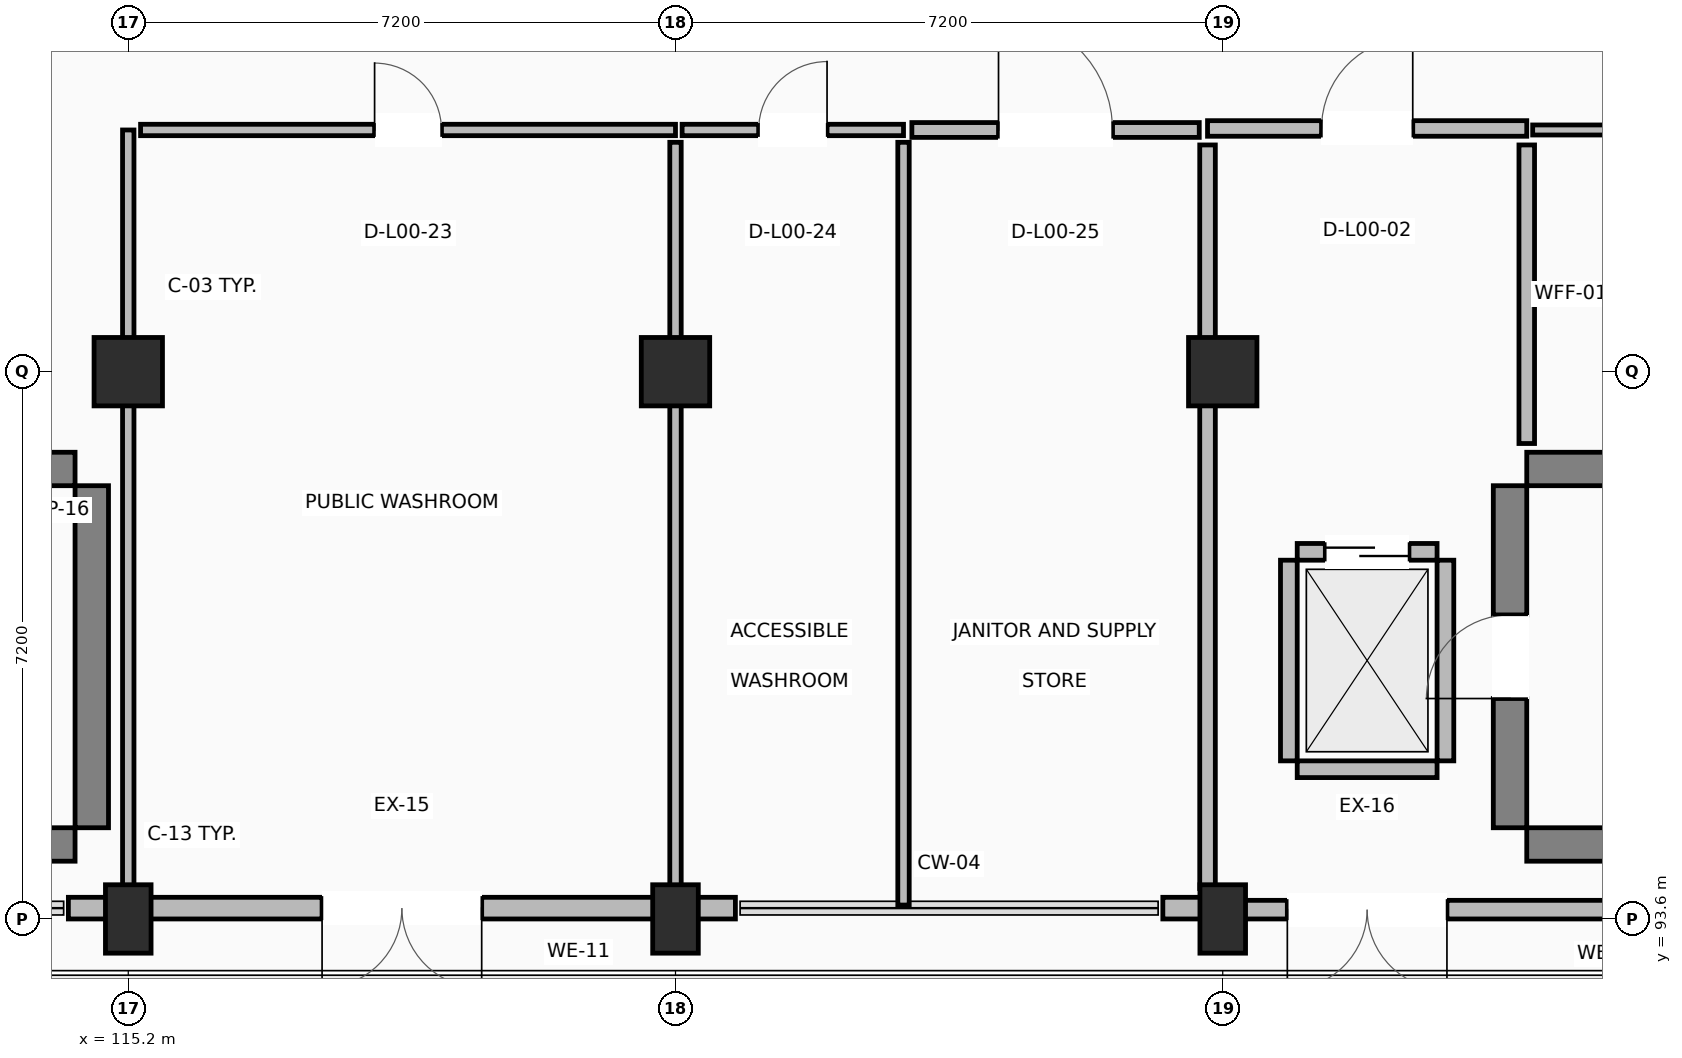
"""IFC4 building model, lengths in metres.
Left out: names, types, materials, properties, quantities, classifications, styles, units other than length and angle.
Written with IfcOpenShell. Run it as: python <this file> out.ifc"""

import sys

from ifc_helpers import new_model, si_unit, direction, frame, frame_2d, origin, origin_2d, place, context, subcontext, project, spatial, rectangle, extrude, element, fill, save


model = new_model("IFC4")
c1 = context("Model", 3, precision=1e-05, world=origin(), true_north=direction((0.0, 1.0)))
c2 = subcontext(c1, "Body", "Model", "MODEL_VIEW")
j1 = project(units=[si_unit("LENGTHUNIT", "METRE"), si_unit("PLANEANGLEUNIT", "RADIAN")], contexts=[c1])
p1 = place(None, origin())
s1 = spatial("IfcSite", under=j1, at=p1, CompositionType="ELEMENT")
p2 = place(p1, origin())
s2 = spatial("IfcBuilding", under=s1, at=p2, CompositionType="ELEMENT")
p3 = place(p2, origin())
s3 = spatial("IfcBuildingStorey", under=s2, at=p3, CompositionType="ELEMENT", Elevation=0.0)
p4 = place(p3, frame((115.2, 93.6, 0.0), z_axis=(0.0, 0.0, 1.0), x_axis=(1.0, 0.0, 0.0)))
e1 = element("IfcColumn", 1, at=p4, inside=s3, PredefinedType="COLUMN", context=c2, shape_type="SweptSolid", body=[
    extrude(rectangle(XDim=0.6, YDim=0.9, at=origin_2d()), origin(), (0.0, 0.0, 1.0), 4.22),
])
p5 = place(p3, frame((115.2, 100.8, 0.0), z_axis=(0.0, 0.0, 1.0), x_axis=(1.0, 0.0, 0.0)))
e2 = element("IfcColumn", 2, at=p5, inside=s3, PredefinedType="COLUMN", context=c2, shape_type="SweptSolid", body=[
    extrude(rectangle(XDim=0.9, YDim=0.9, at=origin_2d()), origin(), (0.0, 0.0, 1.0), 4.22),
])
p6 = place(p3, frame((122.4, 93.6, 0.0), z_axis=(0.0, 0.0, 1.0), x_axis=(1.0, 0.0, 0.0)))
e3 = element("IfcColumn", 3, at=p6, inside=s3, PredefinedType="COLUMN", context=c2, shape_type="SweptSolid", body=[
    extrude(rectangle(XDim=0.6, YDim=0.9, at=origin_2d()), origin(), (0.0, 0.0, 1.0), 4.22),
])
p7 = place(p3, frame((122.4, 100.8, 0.0), z_axis=(0.0, 0.0, 1.0), x_axis=(1.0, 0.0, 0.0)))
e4 = element("IfcColumn", 4, at=p7, inside=s3, PredefinedType="COLUMN", context=c2, shape_type="SweptSolid", body=[
    extrude(rectangle(XDim=0.9, YDim=0.9, at=origin_2d()), origin(), (0.0, 0.0, 1.0), 4.22),
])
p8 = place(p3, frame((129.6, 93.6, 0.0), z_axis=(0.0, 0.0, 1.0), x_axis=(1.0, 0.0, 0.0)))
e5 = element("IfcColumn", 5, at=p8, inside=s3, PredefinedType="COLUMN", context=c2, shape_type="SweptSolid", body=[
    extrude(rectangle(XDim=0.6, YDim=0.9, at=origin_2d()), origin(), (0.0, 0.0, 1.0), 4.22),
])
p9 = place(p3, frame((129.6, 100.8, 0.0), z_axis=(0.0, 0.0, 1.0), x_axis=(1.0, 0.0, 0.0)))
e6 = element("IfcColumn", 6, at=p9, inside=s3, PredefinedType="COLUMN", context=c2, shape_type="SweptSolid", body=[
    extrude(rectangle(XDim=0.9, YDim=0.9, at=origin_2d()), origin(), (0.0, 0.0, 1.0), 4.22),
])
for number, where, z_axis, x_axis in (
    (7, (105.0, 94.58, 0.0), (0.0, 0.0, 1.0), (1.0, 0.0, 0.0)),
    (8, (105.0, 99.52, 0.0), (0.0, 0.0, 1.0), (1.0, 0.0, 0.0)),
):
    element("IfcWall", number, at=place(p3, frame(where, z_axis=z_axis, x_axis=x_axis)), inside=s3, PredefinedType="SHEAR", context=c2, shape_type="SweptSolid", body=[
        extrude(rectangle(XDim=9.5, YDim=0.44, at=frame_2d((4.75, 0.0))), origin(), (0.0, 0.0, 1.0), 4.22),
    ])
p10 = place(p3, frame((114.72, 94.8, 0.0), z_axis=(0.0, 0.0, 1.0), x_axis=(0.0, 1.0, 0.0)))
e9 = element("IfcWall", 9, at=p10, inside=s3, PredefinedType="SHEAR", context=c2, shape_type="SweptSolid", body=[
    extrude(rectangle(XDim=4.5, YDim=0.44, at=frame_2d((2.25, 0.0))), origin(), (0.0, 0.0, 1.0), 4.22),
])
for number, where, z_axis, x_axis in (
    (10, (133.6, 94.58, 0.0), (0.0, 0.0, 1.0), (1.0, 0.0, 0.0)),
    (11, (133.6, 99.52, 0.0), (0.0, 0.0, 1.0), (1.0, 0.0, 0.0)),
):
    element("IfcWall", number, at=place(p3, frame(where, z_axis=z_axis, x_axis=x_axis)), inside=s3, PredefinedType="SHEAR", context=c2, shape_type="SweptSolid", body=[
        extrude(rectangle(XDim=9.5, YDim=0.44, at=frame_2d((4.75, 0.0))), origin(), (0.0, 0.0, 1.0), 4.22),
    ])
p11 = place(p3, frame((133.38, 94.8, 0.0), z_axis=(0.0, 0.0, 1.0), x_axis=(0.0, 1.0, 0.0)))
e12 = element("IfcWall", 12, at=p11, inside=s3, PredefinedType="SHEAR", context=c2, shape_type="SweptSolid", body=[
    extrude(rectangle(XDim=4.5, YDim=0.44, at=frame_2d((2.25, 0.0))), origin(), (0.0, 0.0, 1.0), 4.22),
])
p12 = place(p11, frame((1.7, 0.0, 0.0)))
e13 = element("IfcOpeningElement", 13, at=p12, cuts=e12, PredefinedType="OPENING", context=c2, shape_type="SweptSolid", body=[
    extrude(rectangle(XDim=1.1, YDim=2.15, at=frame_2d((0.55, 1.075))), frame((0.0, 0.23, 0.0), z_axis=(0.0, -1.0, 0.0), x_axis=(1.0, 0.0, 0.0)), (0.0, 0.0, 1.0), 0.46),
])
p13 = place(p3, frame((122.4, 93.742, 0.0), z_axis=(0.0, 0.0, 1.0), x_axis=(-1.0, 0.0, 0.0)))
e14 = element("IfcWall", 14, at=p13, inside=s3, PredefinedType="STANDARD", context=c2, shape_type="SweptSolid", body=[
    extrude(rectangle(XDim=7.2, YDim=0.285, at=frame_2d((3.6, 0.0))), origin(), (0.0, 0.0, 1.0), 2.6),
])
p14 = place(p13, frame((2.55, 0.0, 0.0)))
e15 = element("IfcOpeningElement", 15, at=p14, cuts=e14, PredefinedType="OPENING", context=c2, shape_type="SweptSolid", body=[
    extrude(rectangle(XDim=2.1, YDim=2.3, at=frame_2d((1.05, 1.15))), frame((0.0, 0.152, 0.0), z_axis=(0.0, -1.0, 0.0), x_axis=(1.0, 0.0, 0.0)), (0.0, 0.0, 1.0), 0.305),
])
p15 = place(p3, frame((136.8, 93.722, 0.0), z_axis=(0.0, 0.0, 1.0), x_axis=(-1.0, 0.0, 0.0)))
e16 = element("IfcWall", 16, at=p15, inside=s3, PredefinedType="STANDARD", context=c2, shape_type="SweptSolid", body=[
    extrude(rectangle(XDim=7.2, YDim=0.245, at=frame_2d((3.6, 0.0))), origin(), (0.0, 0.0, 1.0), 2.6),
])
p16 = place(p15, frame((4.25, 0.0, 0.0)))
e17 = element("IfcOpeningElement", 17, at=p16, cuts=e16, PredefinedType="OPENING", context=c2, shape_type="SweptSolid", body=[
    extrude(rectangle(XDim=2.1, YDim=2.3, at=frame_2d((1.05, 1.15))), frame((0.0, 0.133, 0.0), z_axis=(0.0, -1.0, 0.0), x_axis=(1.0, 0.0, 0.0)), (0.0, 0.0, 1.0), 0.265),
])
p17 = place(p3, frame((114.412, 93.742, 0.0), z_axis=(0.0, 0.0, 1.0), x_axis=(1.0, 0.0, 0.0)))
e18 = element("IfcWall", 18, at=p17, inside=s3, PredefinedType="STANDARD", context=c2, shape_type="SweptSolid", body=[
    extrude(rectangle(XDim=0.788, YDim=0.285, at=frame_2d((0.394, 0.0))), origin(), (0.0, 0.0, 1.0), 2.6),
])
for number, where, z_axis, x_axis in (
    (19, (122.4, 93.742, 0.0), (0.0, 0.0, 1.0), (1.0, 0.0, 0.0)),
    (20, (128.812, 93.742, 0.0), (0.0, 0.0, 1.0), (1.0, 0.0, 0.0)),
):
    element("IfcWall", number, at=place(p3, frame(where, z_axis=z_axis, x_axis=x_axis)), inside=s3, PredefinedType="STANDARD", context=c2, shape_type="SweptSolid", body=[
        extrude(rectangle(XDim=0.788, YDim=0.285, at=frame_2d((0.394, 0.0))), origin(), (0.0, 0.0, 1.0), 2.6),
    ])
p18 = place(p3, frame((130.58, 95.57, 0.0), z_axis=(0.0, 0.0, 1.0), x_axis=(1.0, 0.0, 0.0)))
e21 = element("IfcWall", 21, at=p18, inside=s3, PredefinedType="STANDARD", context=c2, shape_type="SweptSolid", body=[
    extrude(rectangle(XDim=1.84, YDim=0.22, at=frame_2d((0.92, 0.0))), origin(), (0.0, 0.0, 1.0), 2.6),
])
p19 = place(p3, frame((130.58, 98.43, 0.0), z_axis=(0.0, 0.0, 1.0), x_axis=(1.0, 0.0, 0.0)))
e22 = element("IfcWall", 22, at=p19, inside=s3, PredefinedType="STANDARD", context=c2, shape_type="SweptSolid", body=[
    extrude(rectangle(XDim=1.84, YDim=0.22, at=frame_2d((0.92, 0.0))), origin(), (0.0, 0.0, 1.0), 2.6),
])
p20 = place(p19, frame((0.37, 0.0, 0.0)))
e23 = element("IfcOpeningElement", 23, at=p20, cuts=e22, PredefinedType="OPENING", context=c2, shape_type="SweptSolid", body=[
    extrude(rectangle(XDim=1.1, YDim=2.15, at=frame_2d((0.55, 1.075))), frame((0.0, 0.12, 0.0), z_axis=(0.0, -1.0, 0.0), x_axis=(1.0, 0.0, 0.0)), (0.0, 0.0, 1.0), 0.24),
])
for number, where, z_axis, x_axis in (
    (24, (130.47, 95.68, 0.0), (0.0, 0.0, 1.0), (0.0, 1.0, 0.0)),
    (25, (132.53, 95.68, 0.0), (0.0, 0.0, 1.0), (0.0, 1.0, 0.0)),
):
    element("IfcWall", number, at=place(p3, frame(where, z_axis=z_axis, x_axis=x_axis)), inside=s3, PredefinedType="STANDARD", context=c2, shape_type="SweptSolid", body=[
        extrude(rectangle(XDim=2.64, YDim=0.22, at=frame_2d((1.32, 0.0))), origin(), (0.0, 0.0, 1.0), 2.6),
    ])
p21 = place(p3, frame((129.4, 104.0, 0.0), z_axis=(0.0, 0.0, 1.0), x_axis=(1.0, 0.0, 0.0)))
e26 = element("IfcWall", 26, at=p21, inside=s3, PredefinedType="PARTITIONING", context=c2, shape_type="SweptSolid", body=[
    extrude(rectangle(XDim=4.2, YDim=0.205, at=frame_2d((2.1, 0.0))), origin(), (0.0, 0.0, 1.0), 2.6),
])
p22 = place(p21, frame((1.5, 0.0, 0.0)))
e27 = element("IfcOpeningElement", 27, at=p22, cuts=e26, PredefinedType="OPENING", context=c2, shape_type="SweptSolid", body=[
    extrude(rectangle(XDim=1.2, YDim=2.15, at=frame_2d((0.6, 1.075))), frame((0.0, 0.113, 0.0), z_axis=(0.0, -1.0, 0.0), x_axis=(1.0, 0.0, 0.0)), (0.0, 0.0, 1.0), 0.225),
])
p23 = place(p3, frame((133.6, 103.783, 0.0), z_axis=(0.0, 0.0, 1.0), x_axis=(0.0, -1.0, 0.0)))
e28 = element("IfcWall", 28, at=p23, inside=s3, PredefinedType="PARTITIONING", context=c2, shape_type="SweptSolid", body=[
    extrude(rectangle(XDim=3.928, YDim=0.205, at=frame_2d((1.964, 0.0))), origin(), (0.0, 0.0, 1.0), 2.6),
])
p24 = place(p3, frame((129.4, 94.0, 0.0), z_axis=(0.0, 0.0, 1.0), x_axis=(0.0, 1.0, 0.0)))
e29 = element("IfcWall", 29, at=p24, inside=s3, PredefinedType="PARTITIONING", context=c2, shape_type="SweptSolid", body=[
    extrude(rectangle(XDim=9.783, YDim=0.205, at=frame_2d((4.892, 0.0))), origin(), (0.0, 0.0, 1.0), 2.6),
])
p25 = place(p3, frame((115.2, 93.972, 0.0), z_axis=(0.0, 0.0, 1.0), x_axis=(0.0, 1.0, 0.0)))
e30 = element("IfcWall", 30, at=p25, inside=s3, PredefinedType="PARTITIONING", context=c2, shape_type="SweptSolid", body=[
    extrude(rectangle(XDim=10.008, YDim=0.15, at=frame_2d((5.004, 0.0))), origin(), (0.0, 0.0, 1.0), 2.6),
])
p26 = place(p3, frame((115.362, 103.98, 0.0), z_axis=(0.0, 0.0, 1.0), x_axis=(1.0, 0.0, 0.0)))
e31 = element("IfcWall", 31, at=p26, inside=s3, PredefinedType="PARTITIONING", context=c2, shape_type="SweptSolid", body=[
    extrude(rectangle(XDim=7.038, YDim=0.15, at=frame_2d((3.519, 0.0))), origin(), (0.0, 0.0, 1.0), 2.6),
])
p27 = place(p26, frame((3.079, 0.0, 0.0)))
e32 = element("IfcOpeningElement", 32, at=p27, cuts=e31, PredefinedType="OPENING", context=c2, shape_type="SweptSolid", body=[
    extrude(rectangle(XDim=0.88, YDim=2.1, at=frame_2d((0.44, 1.05))), frame((0.0, 0.085, 0.0), z_axis=(0.0, -1.0, 0.0), x_axis=(1.0, 0.0, 0.0)), (0.0, 0.0, 1.0), 0.17),
])
p28 = place(p3, frame((122.4, 103.818, 0.0), z_axis=(0.0, 0.0, 1.0), x_axis=(0.0, -1.0, 0.0)))
e33 = element("IfcWall", 33, at=p28, inside=s3, PredefinedType="PARTITIONING", context=c2, shape_type="SweptSolid", body=[
    extrude(rectangle(XDim=9.846, YDim=0.15, at=frame_2d((4.923, 0.0))), origin(), (0.0, 0.0, 1.0), 2.6),
])
p29 = place(p3, frame((122.487, 103.98, 0.0), z_axis=(0.0, 0.0, 1.0), x_axis=(1.0, 0.0, 0.0)))
e34 = element("IfcWall", 34, at=p29, inside=s3, PredefinedType="PARTITIONING", context=c2, shape_type="SweptSolid", body=[
    extrude(rectangle(XDim=2.913, YDim=0.15, at=frame_2d((1.457, 0.0))), origin(), (0.0, 0.0, 1.0), 2.6),
])
p30 = place(p29, frame((1.007, 0.0, 0.0)))
e35 = element("IfcOpeningElement", 35, at=p30, cuts=e34, PredefinedType="OPENING", context=c2, shape_type="SweptSolid", body=[
    extrude(rectangle(XDim=0.9, YDim=2.1, at=frame_2d((0.45, 1.05))), frame((0.0, 0.085, 0.0), z_axis=(0.0, -1.0, 0.0), x_axis=(1.0, 0.0, 0.0)), (0.0, 0.0, 1.0), 0.17),
])
p31 = place(p3, frame((125.4, 103.818, 0.0), z_axis=(0.0, 0.0, 1.0), x_axis=(0.0, -1.0, 0.0)))
e36 = element("IfcWall", 36, at=p31, inside=s3, PredefinedType="PARTITIONING", context=c2, shape_type="SweptSolid", body=[
    extrude(rectangle(XDim=10.035, YDim=0.15, at=frame_2d((5.018, 0.0))), origin(), (0.0, 0.0, 1.0), 2.6),
])
p32 = place(p3, frame((125.51, 103.98, 0.0), z_axis=(0.0, 0.0, 1.0), x_axis=(1.0, 0.0, 0.0)))
e37 = element("IfcWall", 37, at=p32, inside=s3, PredefinedType="PARTITIONING", context=c2, shape_type="SweptSolid", body=[
    extrude(rectangle(XDim=3.781, YDim=0.195, at=frame_2d((1.891, 0.0))), origin(), (0.0, 0.0, 1.0), 2.6),
])
p33 = place(p32, frame((1.14, 0.0, 0.0)))
e38 = element("IfcOpeningElement", 38, at=p33, cuts=e37, PredefinedType="OPENING", context=c2, shape_type="SweptSolid", body=[
    extrude(rectangle(XDim=1.5, YDim=2.15, at=frame_2d((0.75, 1.075))), frame((0.0, 0.107, 0.0), z_axis=(0.0, -1.0, 0.0), x_axis=(1.0, 0.0, 0.0)), (0.0, 0.0, 1.0), 0.215),
])
p34 = place(p3, frame((133.678, 103.98, 0.0), z_axis=(0.0, 0.0, 1.0), x_axis=(1.0, 0.0, 0.0)))
e39 = element("IfcWall", 39, at=p34, inside=s3, PredefinedType="PARTITIONING", context=c2, shape_type="SweptSolid", body=[
    extrude(rectangle(XDim=11.302, YDim=0.132, at=frame_2d((5.651, 0.0))), origin(), (0.0, 0.0, 1.0), 2.6),
])
p35 = place(p34, frame((5.176, 0.0, 0.0)))
e40 = element("IfcOpeningElement", 40, at=p35, cuts=e39, PredefinedType="OPENING", context=c2, shape_type="SweptSolid", body=[
    extrude(rectangle(XDim=0.95, YDim=2.1, at=frame_2d((0.475, 1.05))), frame((0.0, 0.076, 0.0), z_axis=(0.0, -1.0, 0.0), x_axis=(1.0, 0.0, 0.0)), (0.0, 0.0, 1.0), 0.152),
])
p36 = place(p14, origin())
e41 = element("IfcDoor", 41, at=p36, inside=s3, OperationType="DOUBLE_DOOR_SINGLE_SWING", PredefinedType="DOOR", context=c2, shape_type="SweptSolid", body=[
    extrude(rectangle(XDim=2.1, YDim=2.3, at=frame_2d((1.05, 1.15))), frame((0.0, 0.025, 0.0), z_axis=(0.0, -1.0, 0.0), x_axis=(1.0, 0.0, 0.0)), (0.0, 0.0, 1.0), 0.05),
])
fill(e15, e41)
p37 = place(p16, origin())
e42 = element("IfcDoor", 42, at=p37, inside=s3, OperationType="DOUBLE_DOOR_SINGLE_SWING", PredefinedType="DOOR", context=c2, shape_type="SweptSolid", body=[
    extrude(rectangle(XDim=2.1, YDim=2.3, at=frame_2d((1.05, 1.15))), frame((0.0, 0.025, 0.0), z_axis=(0.0, -1.0, 0.0), x_axis=(1.0, 0.0, 0.0)), (0.0, 0.0, 1.0), 0.05),
])
fill(e17, e42)
p38 = place(p12, origin())
e43 = element("IfcDoor", 43, at=p38, inside=s3, OperationType="SINGLE_SWING_LEFT", PredefinedType="DOOR", context=c2, shape_type="SweptSolid", body=[
    extrude(rectangle(XDim=1.1, YDim=2.15, at=frame_2d((0.55, 1.075))), frame((0.0, 0.025, 0.0), z_axis=(0.0, -1.0, 0.0), x_axis=(1.0, 0.0, 0.0)), (0.0, 0.0, 1.0), 0.05),
])
fill(e13, e43)
p39 = place(p20, origin())
e44 = element("IfcDoor", 44, at=p39, inside=s3, OperationType="SLIDING_TO_LEFT", PredefinedType="DOOR", context=c2, shape_type="SweptSolid", body=[
    extrude(rectangle(XDim=1.1, YDim=2.15, at=frame_2d((0.55, 1.075))), frame((0.0, 0.025, 0.0), z_axis=(0.0, -1.0, 0.0), x_axis=(1.0, 0.0, 0.0)), (0.0, 0.0, 1.0), 0.05),
])
fill(e23, e44)
p40 = place(p22, origin())
e45 = element("IfcDoor", 45, at=p40, inside=s3, OperationType="SINGLE_SWING_RIGHT", PredefinedType="DOOR", context=c2, shape_type="SweptSolid", body=[
    extrude(rectangle(XDim=1.2, YDim=2.15, at=frame_2d((0.6, 1.075))), frame((0.0, 0.025, 0.0), z_axis=(0.0, -1.0, 0.0), x_axis=(1.0, 0.0, 0.0)), (0.0, 0.0, 1.0), 0.05),
])
fill(e27, e45)
p41 = place(p27, origin())
e46 = element("IfcDoor", 46, at=p41, inside=s3, OperationType="SINGLE_SWING_LEFT", PredefinedType="DOOR", context=c2, shape_type="SweptSolid", body=[
    extrude(rectangle(XDim=0.88, YDim=2.1, at=frame_2d((0.44, 1.05))), frame((0.0, 0.025, 0.0), z_axis=(0.0, -1.0, 0.0), x_axis=(1.0, 0.0, 0.0)), (0.0, 0.0, 1.0), 0.05),
])
fill(e32, e46)
p42 = place(p30, origin())
e47 = element("IfcDoor", 47, at=p42, inside=s3, OperationType="SINGLE_SWING_RIGHT", PredefinedType="DOOR", context=c2, shape_type="SweptSolid", body=[
    extrude(rectangle(XDim=0.9, YDim=2.1, at=frame_2d((0.45, 1.05))), frame((0.0, 0.025, 0.0), z_axis=(0.0, -1.0, 0.0), x_axis=(1.0, 0.0, 0.0)), (0.0, 0.0, 1.0), 0.05),
])
fill(e35, e47)
p43 = place(p33, origin())
e48 = element("IfcDoor", 48, at=p43, inside=s3, OperationType="SINGLE_SWING_LEFT", PredefinedType="DOOR", context=c2, shape_type="SweptSolid", body=[
    extrude(rectangle(XDim=1.5, YDim=2.15, at=frame_2d((0.75, 1.075))), frame((0.0, 0.025, 0.0), z_axis=(0.0, -1.0, 0.0), x_axis=(1.0, 0.0, 0.0)), (0.0, 0.0, 1.0), 0.05),
])
fill(e38, e48)
save(model, sys.argv[1])
